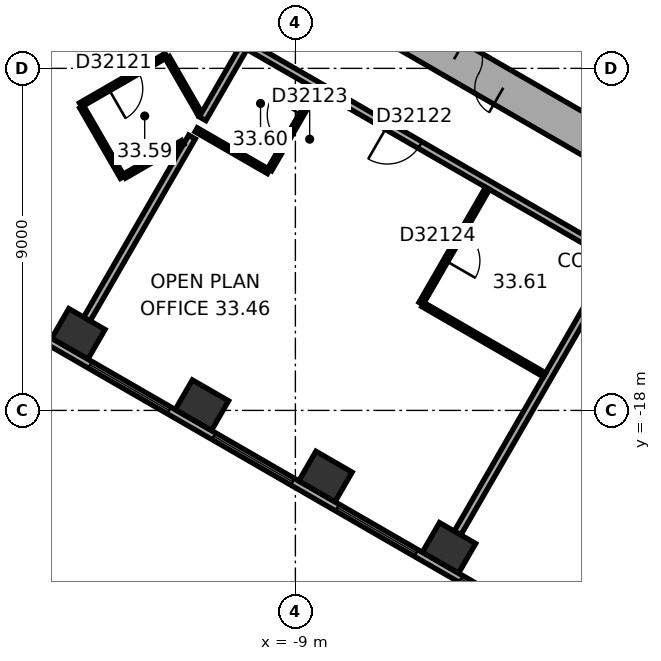
"""IFC4 building model, lengths in metres.
Left out: names, types, materials, properties, quantities, classifications, styles, units other than length and angle.
Written with IfcOpenShell. Run it as: python <this file> out.ifc"""

import sys

from ifc_helpers import new_model, si_unit, direction, frame, frame_2d, origin, origin_2d, place, context, subcontext, project, spatial, rectangle, extrude, element, fill, save


model = new_model("IFC4")
c1 = context("Model", 3, precision=1e-05, world=origin(), true_north=direction((0.0, 1.0)))
c2 = subcontext(c1, "Body", "Model", "MODEL_VIEW")
j1 = project(units=[si_unit("LENGTHUNIT", "METRE"), si_unit("PLANEANGLEUNIT", "RADIAN")], contexts=[c1])
p1 = place(None, origin())
s1 = spatial("IfcSite", under=j1, at=p1, CompositionType="ELEMENT")
p2 = place(p1, origin())
s2 = spatial("IfcBuilding", under=s1, at=p2, CompositionType="ELEMENT")
p3 = place(p2, frame((0.0, 0.0, 135.5)))
s3 = spatial("IfcBuildingStorey", under=s2, at=p3, CompositionType="ELEMENT", Elevation=135.5)
for number, where, z_axis, x_axis in (
    (1, (-14.711, -15.986, 0.0), (0.0, 0.0, 1.0), (0.866, -0.5, 0.0)),
    (2, (-11.46, -17.863, 0.0), (0.0, 0.0, 1.0), (0.866, -0.5, 0.0)),
    (3, (-8.208, -19.74, 0.0), (0.0, 0.0, 1.0), (0.866, -0.5, 0.0)),
    (4, (-4.958, -21.617, 0.0), (0.0, 0.0, 1.0), (0.866, -0.5, 0.0)),
):
    element("IfcColumn", number, at=place(p3, frame(where, z_axis=z_axis, x_axis=x_axis)), inside=s3, PredefinedType="COLUMN", context=c2, shape_type="SweptSolid", body=[
        extrude(rectangle(XDim=1.1, YDim=0.9, at=origin_2d()), origin(), (0.0, 0.0, 1.0), 3.7),
    ])
p4 = place(p3, frame((-10.25, -5.629, 0.0), z_axis=(0.0, 0.0, 1.0), x_axis=(0.866022616891, -0.50000482701, 0.0)))
e5 = element("IfcWall", 5, at=p4, inside=s3, PredefinedType="SHEAR", context=c2, shape_type="SweptSolid", body=[
    extrude(rectangle(XDim=12.125, YDim=1.0, at=frame_2d((6.062, 0.0))), origin(), (0.0, 0.0, 1.0), 3.7),
])
p5 = place(p4, frame((6.262, 0.0, 0.0)))
e6 = element("IfcOpeningElement", 6, at=p5, cuts=e5, PredefinedType="OPENING", context=c2, shape_type="SweptSolid", body=[
    extrude(rectangle(XDim=1.5, YDim=2.1, at=frame_2d((0.75, 1.05))), frame((0.0, 0.51, 0.0), z_axis=(0.0, -1.0, 0.0), x_axis=(1.0, 0.0, 0.0)), (0.0, 0.0, 1.0), 1.02),
])
p6 = place(p3, frame((-18.789, -14.267, 0.0), z_axis=(0.0, 0.0, 1.0), x_axis=(0.866023315909, -0.500003616288, 0.0)))
e7 = element("IfcWall", 7, at=p6, inside=s3, PredefinedType="STANDARD", context=c2, shape_type="SweptSolid", body=[
    extrude(rectangle(XDim=20.044, YDim=0.2, at=frame_2d((10.022, 0.0))), origin(), (0.0, 0.0, 1.0), 3.7),
])
p7 = place(p6, frame((1.314, 0.0, 0.9)))
e8 = element("IfcOpeningElement", 8, at=p7, cuts=e7, PredefinedType="OPENING", context=c2, shape_type="SweptSolid", body=[
    extrude(rectangle(XDim=2.4, YDim=2.0, at=frame_2d((1.2, 1.0))), frame((0.0, 0.11, 0.0), z_axis=(0.0, -1.0, 0.0), x_axis=(1.0, 0.0, 0.0)), (0.0, 0.0, 1.0), 0.22),
])
p8 = place(p6, frame((5.069, 0.0, 0.9)))
e9 = element("IfcOpeningElement", 9, at=p8, cuts=e7, PredefinedType="OPENING", context=c2, shape_type="SweptSolid", body=[
    extrude(rectangle(XDim=2.4, YDim=2.0, at=frame_2d((1.2, 1.0))), frame((0.0, 0.11, 0.0), z_axis=(0.0, -1.0, 0.0), x_axis=(1.0, 0.0, 0.0)), (0.0, 0.0, 1.0), 0.22),
])
p9 = place(p6, frame((8.823, 0.0, 0.9)))
e10 = element("IfcOpeningElement", 10, at=p9, cuts=e7, PredefinedType="OPENING", context=c2, shape_type="SweptSolid", body=[
    extrude(rectangle(XDim=2.4, YDim=2.0, at=frame_2d((1.2, 1.0))), frame((0.0, 0.11, 0.0), z_axis=(0.0, -1.0, 0.0), x_axis=(1.0, 0.0, 0.0)), (0.0, 0.0, 1.0), 0.22),
])
p10 = place(p6, frame((12.577, 0.0, 0.9)))
e11 = element("IfcOpeningElement", 11, at=p10, cuts=e7, PredefinedType="OPENING", context=c2, shape_type="SweptSolid", body=[
    extrude(rectangle(XDim=2.4, YDim=2.0, at=frame_2d((1.2, 1.0))), frame((0.0, 0.11, 0.0), z_axis=(0.0, -1.0, 0.0), x_axis=(1.0, 0.0, 0.0)), (0.0, 0.0, 1.0), 0.22),
])
p11 = place(p6, frame((16.331, 0.0, 0.9)))
e12 = element("IfcOpeningElement", 12, at=p11, cuts=e7, PredefinedType="OPENING", context=c2, shape_type="SweptSolid", body=[
    extrude(rectangle(XDim=2.4, YDim=2.0, at=frame_2d((1.2, 1.0))), frame((0.0, 0.11, 0.0), z_axis=(0.0, -1.0, 0.0), x_axis=(1.0, 0.0, 0.0)), (0.0, 0.0, 1.0), 0.22),
])
p12 = place(p3, frame((-14.653, -9.961, 0.0), z_axis=(0.0, 0.0, 1.0), x_axis=(0.866021400173, 0.500006934395, 0.0)))
e13 = element("IfcWall", 13, at=p12, inside=s3, PredefinedType="PARTITIONING", context=c2, shape_type="SweptSolid", body=[
    extrude(rectangle(XDim=2.6, YDim=0.12, at=frame_2d((1.3, 0.0))), origin(), (0.0, 0.0, 1.0), 3.35),
])
p13 = place(p12, frame((0.85, 0.0, 0.0)))
e14 = element("IfcOpeningElement", 14, at=p13, cuts=e13, PredefinedType="OPENING", context=c2, shape_type="SweptSolid", body=[
    extrude(rectangle(XDim=0.9, YDim=2.1, at=frame_2d((0.45, 1.05))), frame((0.0, 0.07, 0.0), z_axis=(0.0, -1.0, 0.0), x_axis=(1.0, 0.0, 0.0)), (0.0, 0.0, 1.0), 0.14),
])
p14 = place(p3, frame((-14.486, -15.597, 0.0), z_axis=(0.0, 0.0, 1.0), x_axis=(0.500003965547, 0.866023114263, 0.0)))
e15 = element("IfcWall", 15, at=p14, inside=s3, PredefinedType="PARTITIONING", context=c2, shape_type="SweptSolid", body=[
    extrude(rectangle(XDim=5.53, YDim=0.2, at=frame_2d((2.765, 0.0))), origin(), (0.0, 0.0, 1.0), 3.35),
])
p15 = place(p3, frame((-13.552, -11.866, 0.0), z_axis=(0.0, 0.0, 1.0), x_axis=(-0.500028586798, 0.86600889856, 0.0)))
e16 = element("IfcWall", 16, at=p15, inside=s3, PredefinedType="PARTITIONING", context=c2, shape_type="SweptSolid", body=[
    extrude(rectangle(XDim=2.14, YDim=0.12, at=frame_2d((1.07, 0.0))), origin(), (0.0, 0.0, 1.0), 3.35),
])
p16 = place(p3, frame((-12.371, -8.713, 0.0), z_axis=(0.0, 0.0, 1.0), x_axis=(0.499910907645, -0.86607683517, 0.0)))
e17 = element("IfcWall", 17, at=p16, inside=s3, PredefinedType="PARTITIONING", context=c2, shape_type="SweptSolid", body=[
    extrude(rectangle(XDim=1.719, YDim=0.12, at=frame_2d((0.86, 0.0))), origin(), (0.0, 0.0, 1.0), 3.35),
])
p17 = place(p3, frame((-11.964, -10.949, 0.0), z_axis=(0.0, 0.0, 1.0), x_axis=(-0.86600680221, -0.500032217487, 0.0)))
e18 = element("IfcWall", 18, at=p17, inside=s3, PredefinedType="PARTITIONING", context=c2, shape_type="SweptSolid", body=[
    extrude(rectangle(XDim=1.774, YDim=0.12, at=frame_2d((0.887, 0.0))), origin(), (0.0, 0.0, 1.0), 3.35),
])
p18 = place(p3, frame((-11.442, -10.325, 0.0), z_axis=(0.0, 0.0, 1.0), x_axis=(0.500012369163, 0.866018262327, 0.0)))
e19 = element("IfcWall", 19, at=p18, inside=s3, PredefinedType="PARTITIONING", context=c2, shape_type="SweptSolid", body=[
    extrude(rectangle(XDim=2.163, YDim=0.2, at=frame_2d((1.081, 0.0))), origin(), (0.0, 0.0, 1.0), 3.35),
])
p19 = place(p3, frame((-11.415, -7.728, 0.0), z_axis=(0.0, 0.0, 1.0), x_axis=(0.866022749921, -0.500004596598, 0.0)))
e20 = element("IfcWall", 20, at=p19, inside=s3, PredefinedType="PARTITIONING", context=c2, shape_type="SweptSolid", body=[
    extrude(rectangle(XDim=12.084, YDim=0.2, at=frame_2d((6.042, 0.0))), origin(), (0.0, 0.0, 1.0), 3.35),
])
p20 = place(p19, frame((5.58, 0.0, 0.0)))
e21 = element("IfcOpeningElement", 21, at=p20, cuts=e20, PredefinedType="OPENING", context=c2, shape_type="SweptSolid", body=[
    extrude(rectangle(XDim=1.0, YDim=2.1, at=frame_2d((0.5, 1.05))), frame((0.0, 0.11, 0.0), z_axis=(0.0, -1.0, 0.0), x_axis=(1.0, 0.0, 0.0)), (0.0, 0.0, 1.0), 0.22),
])
p21 = place(p3, frame((-9.706, -11.717, 0.0), z_axis=(0.0, 0.0, 1.0), x_axis=(-0.86598042715, 0.500077893725, 0.0)))
e22 = element("IfcWall", 22, at=p21, inside=s3, PredefinedType="PARTITIONING", context=c2, shape_type="SweptSolid", body=[
    extrude(rectangle(XDim=2.2, YDim=0.12, at=frame_2d((1.1, 0.0))), origin(), (0.0, 0.0, 1.0), 3.35),
])
p22 = place(p3, frame((-8.456, -9.552, 0.0), z_axis=(0.0, 0.0, 1.0), x_axis=(-0.500002508028, -0.866023955769, 0.0)))
e23 = element("IfcWall", 23, at=p22, inside=s3, PredefinedType="PARTITIONING", context=c2, shape_type="SweptSolid", body=[
    extrude(rectangle(XDim=2.44, YDim=0.12, at=frame_2d((1.22, 0.0))), origin(), (0.0, 0.0, 1.0), 3.35),
])
p23 = place(p22, frame((0.77, 0.0, 0.0)))
e24 = element("IfcOpeningElement", 24, at=p23, cuts=e23, PredefinedType="OPENING", context=c2, shape_type="SweptSolid", body=[
    extrude(rectangle(XDim=0.9, YDim=2.1, at=frame_2d((0.45, 1.05))), frame((0.0, 0.07, 0.0), z_axis=(0.0, -1.0, 0.0), x_axis=(1.0, 0.0, 0.0)), (0.0, 0.0, 1.0), 0.14),
])
p24 = place(p3, frame((-5.695, -15.188, 0.0), z_axis=(0.0, 0.0, 1.0), x_axis=(0.500010275428, 0.866019471182, 0.0)))
e25 = element("IfcWall", 25, at=p24, inside=s3, PredefinedType="PARTITIONING", context=c2, shape_type="SweptSolid", body=[
    extrude(rectangle(XDim=3.5, YDim=0.12, at=frame_2d((1.75, 0.0))), origin(), (0.0, 0.0, 1.0), 3.35),
])
p25 = place(p24, frame((1.3, 0.0, 0.0)))
e26 = element("IfcOpeningElement", 26, at=p25, cuts=e25, PredefinedType="OPENING", context=c2, shape_type="SweptSolid", body=[
    extrude(rectangle(XDim=0.9, YDim=2.1, at=frame_2d((0.45, 1.05))), frame((0.0, 0.07, 0.0), z_axis=(0.0, -1.0, 0.0), x_axis=(1.0, 0.0, 0.0)), (0.0, 0.0, 1.0), 0.14),
])
p26 = place(p3, frame((-4.732, -21.228, 0.0), z_axis=(0.0, 0.0, 1.0), x_axis=(0.500000843414, 0.866024916838, 0.0)))
e27 = element("IfcWall", 27, at=p26, inside=s3, PredefinedType="PARTITIONING", context=c2, shape_type="SweptSolid", body=[
    extrude(rectangle(XDim=8.452, YDim=0.2, at=frame_2d((4.226, 0.0))), origin(), (0.0, 0.0, 1.0), 3.35),
])
p27 = place(p3, frame((-2.444, -17.064, 0.0), z_axis=(0.0, 0.0, 1.0), x_axis=(-0.86602156466, 0.500006649499, 0.0)))
e28 = element("IfcWall", 28, at=p27, inside=s3, PredefinedType="PARTITIONING", context=c2, shape_type="SweptSolid", body=[
    extrude(rectangle(XDim=3.693, YDim=0.12, at=frame_2d((1.847, 0.0))), origin(), (0.0, 0.0, 1.0), 3.35),
])
p28 = place(p8, origin())
e29 = element("IfcWindow", 29, at=p28, inside=s3, PartitioningType="SINGLE_PANEL", PredefinedType="WINDOW", context=c2, shape_type="SweptSolid", body=[
    extrude(rectangle(XDim=2.4, YDim=2.0, at=frame_2d((1.2, 1.0))), frame((0.0, 0.03, 0.0), z_axis=(0.0, -1.0, 0.0), x_axis=(1.0, 0.0, 0.0)), (0.0, 0.0, 1.0), 0.06),
])
fill(e9, e29)
p29 = place(p9, origin())
e30 = element("IfcWindow", 30, at=p29, inside=s3, PartitioningType="SINGLE_PANEL", PredefinedType="WINDOW", context=c2, shape_type="SweptSolid", body=[
    extrude(rectangle(XDim=2.4, YDim=2.0, at=frame_2d((1.2, 1.0))), frame((0.0, 0.03, 0.0), z_axis=(0.0, -1.0, 0.0), x_axis=(1.0, 0.0, 0.0)), (0.0, 0.0, 1.0), 0.06),
])
fill(e10, e30)
p30 = place(p10, origin())
e31 = element("IfcWindow", 31, at=p30, inside=s3, PartitioningType="SINGLE_PANEL", PredefinedType="WINDOW", context=c2, shape_type="SweptSolid", body=[
    extrude(rectangle(XDim=2.4, YDim=2.0, at=frame_2d((1.2, 1.0))), frame((0.0, 0.03, 0.0), z_axis=(0.0, -1.0, 0.0), x_axis=(1.0, 0.0, 0.0)), (0.0, 0.0, 1.0), 0.06),
])
fill(e11, e31)
p31 = place(p11, origin())
e32 = element("IfcWindow", 32, at=p31, inside=s3, PartitioningType="SINGLE_PANEL", PredefinedType="WINDOW", context=c2, shape_type="SweptSolid", body=[
    extrude(rectangle(XDim=2.4, YDim=2.0, at=frame_2d((1.2, 1.0))), frame((0.0, 0.03, 0.0), z_axis=(0.0, -1.0, 0.0), x_axis=(1.0, 0.0, 0.0)), (0.0, 0.0, 1.0), 0.06),
])
fill(e12, e32)
p32 = place(p5, origin())
e33 = element("IfcDoor", 33, at=p32, inside=s3, OperationType="DOUBLE_DOOR_SINGLE_SWING", PredefinedType="DOOR", context=c2, shape_type="SweptSolid", body=[
    extrude(rectangle(XDim=1.5, YDim=2.1, at=frame_2d((0.75, 1.05))), frame((0.0, 0.025, 0.0), z_axis=(0.0, -1.0, 0.0), x_axis=(1.0, 0.0, 0.0)), (0.0, 0.0, 1.0), 0.05),
])
fill(e6, e33)
p33 = place(p13, origin())
e34 = element("IfcDoor", 34, at=p33, inside=s3, OperationType="SINGLE_SWING_LEFT", PredefinedType="DOOR", context=c2, shape_type="SweptSolid", body=[
    extrude(rectangle(XDim=0.9, YDim=2.1, at=frame_2d((0.45, 1.05))), frame((0.0, 0.025, 0.0), z_axis=(0.0, -1.0, 0.0), x_axis=(1.0, 0.0, 0.0)), (0.0, 0.0, 1.0), 0.05),
])
fill(e14, e34)
p34 = place(p20, origin())
e35 = element("IfcDoor", 35, at=p34, inside=s3, OperationType="SINGLE_SWING_LEFT", PredefinedType="DOOR", context=c2, shape_type="SweptSolid", body=[
    extrude(rectangle(XDim=1.0, YDim=2.1, at=frame_2d((0.5, 1.05))), frame((0.0, 0.025, 0.0), z_axis=(0.0, -1.0, 0.0), x_axis=(1.0, 0.0, 0.0)), (0.0, 0.0, 1.0), 0.05),
])
fill(e21, e35)
p35 = place(p23, origin())
e36 = element("IfcDoor", 36, at=p35, inside=s3, OperationType="SINGLE_SWING_LEFT", PredefinedType="DOOR", context=c2, shape_type="SweptSolid", body=[
    extrude(rectangle(XDim=0.9, YDim=2.1, at=frame_2d((0.45, 1.05))), frame((0.0, 0.025, 0.0), z_axis=(0.0, -1.0, 0.0), x_axis=(1.0, 0.0, 0.0)), (0.0, 0.0, 1.0), 0.05),
])
fill(e24, e36)
p36 = place(p25, origin())
e37 = element("IfcDoor", 37, at=p36, inside=s3, OperationType="SINGLE_SWING_LEFT", PredefinedType="DOOR", context=c2, shape_type="SweptSolid", body=[
    extrude(rectangle(XDim=0.9, YDim=2.1, at=frame_2d((0.45, 1.05))), frame((0.0, 0.025, 0.0), z_axis=(0.0, -1.0, 0.0), x_axis=(1.0, 0.0, 0.0)), (0.0, 0.0, 1.0), 0.05),
])
fill(e26, e37)
save(model, sys.argv[1])
